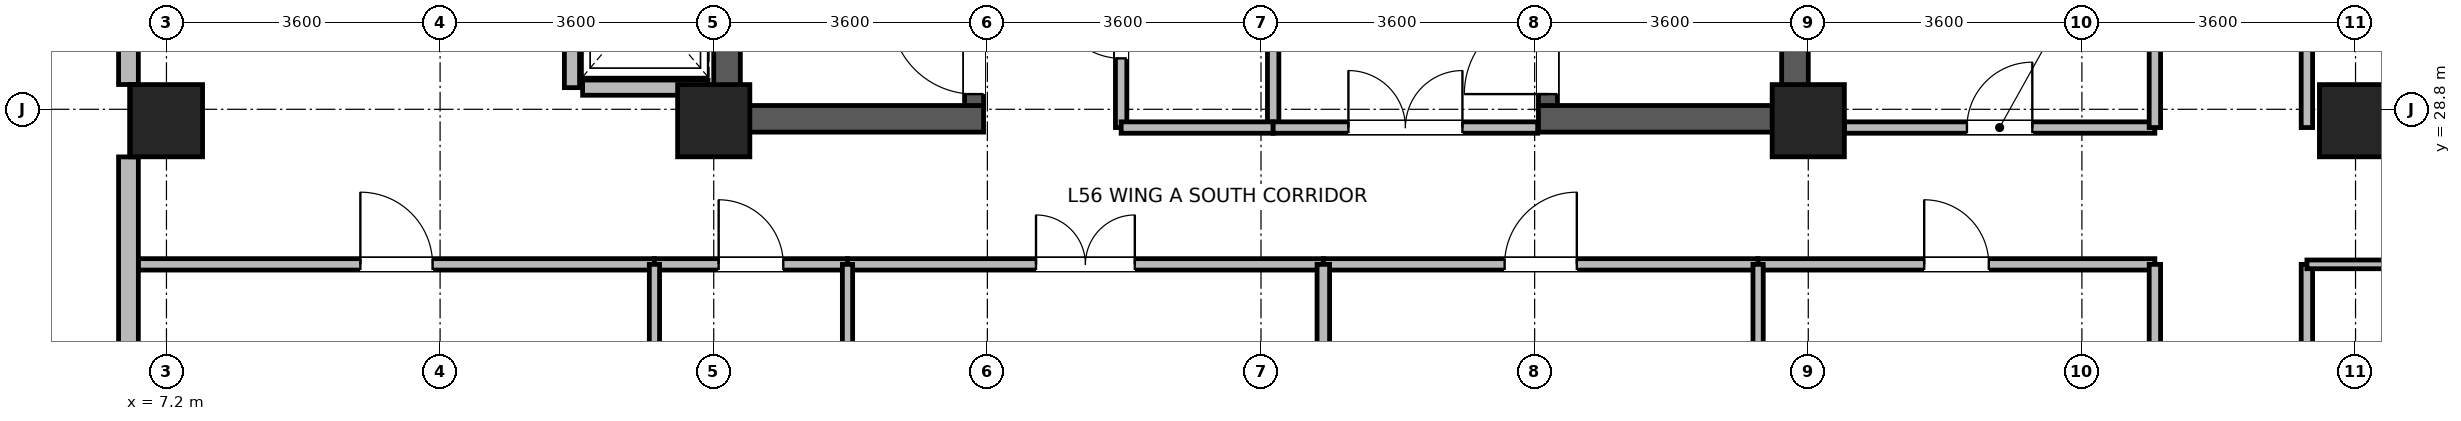
"""IFC4 building model, lengths in metres.
Left out: names, types, materials, properties, quantities, classifications, styles, units other than length and angle.
Written with IfcOpenShell. Run it as: python <this file> out.ifc"""

import sys

from ifc_helpers import new_model, si_unit, direction, frame, frame_2d, origin, origin_2d, place, context, subcontext, project, spatial, rectangle, extrude, source, transform, mapped, element, fill, save


model = new_model("IFC4")
c1 = context("Model", 3, precision=1e-05, world=origin(), true_north=direction((0.0, 1.0)))
c2 = subcontext(c1, "Body", "Model", "MODEL_VIEW")
j1 = project(units=[si_unit("LENGTHUNIT", "METRE"), si_unit("PLANEANGLEUNIT", "RADIAN")], contexts=[c1])
p1 = place(None, origin())
s1 = spatial("IfcSite", under=j1, at=p1, CompositionType="ELEMENT")
p2 = place(p1, origin())
s2 = spatial("IfcBuilding", under=s1, at=p2, CompositionType="ELEMENT")
p3 = place(p2, frame((0.0, 0.0, 220.3)))
s3 = spatial("IfcBuildingStorey", under=s2, at=p3, CompositionType="ELEMENT", Elevation=220.3)
for number, where, z_axis, x_axis in (
    (1, (14.575, 28.5, 0.0), (0.0, 0.0, 1.0), (0.0, 1.0, 0.0)),
    (2, (28.625, 28.5, 0.0), (0.0, 0.0, 1.0), (0.0, 1.0, 0.0)),
):
    element("IfcWall", number, at=place(p3, frame(where, z_axis=z_axis, x_axis=x_axis)), inside=s3, PredefinedType="SHEAR", context=c2, shape_type="SweptSolid", body=[
        extrude(rectangle(XDim=7.7, YDim=0.35, at=frame_2d((3.85, 0.0))), origin(), (0.0, 0.0, 1.0), 3.47),
    ])
for number, where, z_axis, x_axis in (
    (3, (14.75, 28.675, 0.0), (0.0, 0.0, 1.0), (1.0, 0.0, 0.0)),
    (4, (25.25, 28.675, 0.0), (0.0, 0.0, 1.0), (1.0, 0.0, 0.0)),
):
    element("IfcWall", number, at=place(p3, frame(where, z_axis=z_axis, x_axis=x_axis)), inside=s3, PredefinedType="SHEAR", context=c2, shape_type="SweptSolid", body=[
        extrude(rectangle(XDim=3.2, YDim=0.35, at=frame_2d((1.6, 0.0))), origin(), (0.0, 0.0, 1.0), 3.47),
    ])
p4 = place(p3, frame((17.825, 28.85, 0.0), z_axis=(0.0, 0.0, 1.0), x_axis=(0.0, 1.0, 0.0)))
e5 = element("IfcWall", 5, at=p4, inside=s3, PredefinedType="SHEAR", context=c2, shape_type="SweptSolid", body=[
    extrude(rectangle(XDim=7.0, YDim=0.25, at=frame_2d((3.5, 0.0))), origin(), (0.0, 0.0, 1.0), 3.47),
])
p5 = place(p4, frame((0.15, 0.0, 0.0)))
e6 = element("IfcOpeningElement", 6, at=p5, cuts=e5, PredefinedType="OPENING", context=c2, shape_type="SweptSolid", body=[
    extrude(rectangle(XDim=1.1, YDim=2.08, at=frame_2d((0.55, 1.04))), frame((0.0, 0.135, 0.0), z_axis=(0.0, -1.0, 0.0), x_axis=(1.0, 0.0, 0.0)), (0.0, 0.0, 1.0), 0.27),
])
p6 = place(p3, frame((25.375, 28.85, 0.0), z_axis=(0.0, 0.0, 1.0), x_axis=(0.0, 1.0, 0.0)))
e7 = element("IfcWall", 7, at=p6, inside=s3, PredefinedType="SHEAR", context=c2, shape_type="SweptSolid", body=[
    extrude(rectangle(XDim=7.0, YDim=0.25, at=frame_2d((3.5, 0.0))), origin(), (0.0, 0.0, 1.0), 3.47),
])
p7 = place(p6, frame((0.15, 0.0, 0.0)))
e8 = element("IfcOpeningElement", 8, at=p7, cuts=e7, PredefinedType="OPENING", context=c2, shape_type="SweptSolid", body=[
    extrude(rectangle(XDim=1.1, YDim=2.08, at=frame_2d((0.55, 1.04))), frame((0.0, 0.135, 0.0), z_axis=(0.0, -1.0, 0.0), x_axis=(1.0, 0.0, 0.0)), (0.0, 0.0, 1.0), 0.27),
])
m1 = source(origin(), c2, "Body", "SweptSolid", [
    extrude(rectangle(XDim=0.95, YDim=0.95, at=origin_2d()), origin(), (0.0, 0.0, 1.0), 3.7),
])
for number, where, z_axis, x_axis in (
    (9, (7.2, 28.65, 0.0), (0.0, 0.0, 1.0), (1.0, 0.0, 0.0)),
    (10, (14.4, 28.65, 0.0), (0.0, 0.0, 1.0), (1.0, 0.0, 0.0)),
    (11, (28.8, 28.65, 0.0), (0.0, 0.0, 1.0), (1.0, 0.0, 0.0)),
    (12, (36.0, 28.65, 0.0), (0.0, 0.0, 1.0), (1.0, 0.0, 0.0)),
):
    element("IfcColumn", number, at=place(p3, frame(where, z_axis=z_axis, x_axis=x_axis)), inside=s3, PredefinedType="COLUMN", context=c2, shape_type="MappedRepresentation", body=[
        mapped(m1, transform((0.0, 0.0, 0.0), x_axis=(1.0, 0.0, 0.0), y_axis=(0.0, 1.0, 0.0), z_axis=(0.0, 0.0, 1.0), scale=1.0)),
    ])
p8 = place(p3, frame((6.7, 29.126, 0.0), z_axis=(0.0, 0.0, 1.0), x_axis=(0.0, 1.0, 0.0)))
e13 = element("IfcWall", 13, at=p8, inside=s3, PredefinedType="STANDARD", context=c2, shape_type="SweptSolid", body=[
    extrude(rectangle(XDim=6.548, YDim=0.26, at=frame_2d((3.274, 0.0))), origin(), (0.0, 0.0, 1.0), 3.45),
])
p9 = place(p8, frame((0.737, 0.0, 0.85)))
e14 = element("IfcOpeningElement", 14, at=p9, cuts=e13, PredefinedType="OPENING", context=c2, shape_type="SweptSolid", body=[
    extrude(rectangle(XDim=1.8, YDim=1.85, at=frame_2d((0.9, 0.925))), frame((0.0, 0.14, 0.0), z_axis=(0.0, -1.0, 0.0), x_axis=(1.0, 0.0, 0.0)), (0.0, 0.0, 1.0), 0.28),
])
p10 = place(p8, frame((4.011, 0.0, 0.85)))
e15 = element("IfcOpeningElement", 15, at=p10, cuts=e13, PredefinedType="OPENING", context=c2, shape_type="SweptSolid", body=[
    extrude(rectangle(XDim=1.8, YDim=1.85, at=frame_2d((0.9, 0.925))), frame((0.0, 0.14, 0.0), z_axis=(0.0, -1.0, 0.0), x_axis=(1.0, 0.0, 0.0)), (0.0, 0.0, 1.0), 0.28),
])
p11 = place(p3, frame((6.7, 21.47, 0.0), z_axis=(0.0, 0.0, 1.0), x_axis=(0.0, 1.0, 0.0)))
e16 = element("IfcWall", 16, at=p11, inside=s3, PredefinedType="STANDARD", context=c2, shape_type="SweptSolid", body=[
    extrude(rectangle(XDim=6.704, YDim=0.26, at=frame_2d((3.352, 0.0))), origin(), (0.0, 0.0, 1.0), 3.45),
])
p12 = place(p11, frame((2.877, 0.0, 0.85)))
e17 = element("IfcOpeningElement", 17, at=p12, cuts=e16, PredefinedType="OPENING", context=c2, shape_type="SweptSolid", body=[
    extrude(rectangle(XDim=0.95, YDim=1.75, at=frame_2d((0.475, 0.875))), frame((0.0, 0.14, 0.0), z_axis=(0.0, -1.0, 0.0), x_axis=(1.0, 0.0, 0.0)), (0.0, 0.0, 1.0), 0.28),
])
p13 = place(p3, frame((12.675, 29.085, 0.0), z_axis=(0.0, 0.0, 1.0), x_axis=(1.0, 0.0, 0.0)))
e18 = element("IfcWall", 18, at=p13, inside=s3, PredefinedType="PARTITIONING", context=c2, shape_type="SweptSolid", body=[
    extrude(rectangle(XDim=1.65, YDim=0.2, at=frame_2d((0.825, 0.0))), origin(), (0.0, 0.0, 1.0), 3.45),
])
p14 = place(p3, frame((12.535, 29.085, 0.0), z_axis=(0.0, 0.0, 1.0), x_axis=(0.0, 1.0, 0.0)))
e19 = element("IfcWall", 19, at=p14, inside=s3, PredefinedType="PARTITIONING", context=c2, shape_type="SweptSolid", body=[
    extrude(rectangle(XDim=2.23, YDim=0.2, at=frame_2d((1.115, 0.0))), origin(), (0.0, 0.0, 1.0), 3.45),
])
p15 = place(p3, frame((35.36, 16.96, 0.0), z_axis=(0.0, 0.0, 1.0), x_axis=(0.0, 1.0, 0.0)))
e20 = element("IfcWall", 20, at=p15, inside=s3, PredefinedType="PARTITIONING", context=c2, shape_type="SweptSolid", body=[
    extrude(rectangle(XDim=9.8, YDim=0.15, at=frame_2d((4.9, 0.0))), origin(), (0.0, 0.0, 1.0), 3.45),
])
p16 = place(p15, frame((2.486, 0.0, 0.0)))
e21 = element("IfcOpeningElement", 21, at=p16, cuts=e20, PredefinedType="OPENING", context=c2, shape_type="SweptSolid", body=[
    extrude(rectangle(XDim=1.3, YDim=2.12, at=frame_2d((0.65, 1.06))), frame((0.0, 0.085, 0.0), z_axis=(0.0, -1.0, 0.0), x_axis=(1.0, 0.0, 0.0)), (0.0, 0.0, 1.0), 0.17),
])
p17 = place(p3, frame((35.36, 28.56, 0.0), z_axis=(0.0, 0.0, 1.0), x_axis=(0.0, 1.0, 0.0)))
e22 = element("IfcWall", 22, at=p17, inside=s3, PredefinedType="PARTITIONING", context=c2, shape_type="SweptSolid", body=[
    extrude(rectangle(XDim=7.68, YDim=0.15, at=frame_2d((3.84, 0.0))), origin(), (0.0, 0.0, 1.0), 3.45),
])
p18 = place(p17, frame((3.19, 0.0, 0.0)))
e23 = element("IfcOpeningElement", 23, at=p18, cuts=e22, PredefinedType="OPENING", context=c2, shape_type="SweptSolid", body=[
    extrude(rectangle(XDim=1.3, YDim=2.12, at=frame_2d((0.65, 1.06))), frame((0.0, 0.085, 0.0), z_axis=(0.0, -1.0, 0.0), x_axis=(1.0, 0.0, 0.0)), (0.0, 0.0, 1.0), 0.17),
])
p19 = place(p3, frame((6.832, 26.76, 0.0), z_axis=(0.0, 0.0, 1.0), x_axis=(1.0, 0.0, 0.0)))
e24 = element("IfcWall", 24, at=p19, inside=s3, PredefinedType="PARTITIONING", context=c2, shape_type="SweptSolid", body=[
    extrude(rectangle(XDim=6.788, YDim=0.15, at=frame_2d((3.394, 0.0))), origin(), (0.0, 0.0, 1.0), 3.45),
])
p20 = place(p19, frame((2.919, 0.0, 0.0)))
e25 = element("IfcOpeningElement", 25, at=p20, cuts=e24, PredefinedType="OPENING", context=c2, shape_type="SweptSolid", body=[
    extrude(rectangle(XDim=0.95, YDim=2.1, at=frame_2d((0.475, 1.05))), frame((0.0, 0.085, 0.0), z_axis=(0.0, -1.0, 0.0), x_axis=(1.0, 0.0, 0.0)), (0.0, 0.0, 1.0), 0.17),
])
p21 = place(p3, frame((16.16, 26.76, 0.0), z_axis=(0.0, 0.0, 1.0), x_axis=(1.0, 0.0, 0.0)))
e26 = element("IfcWall", 26, at=p21, inside=s3, PredefinedType="PARTITIONING", context=c2, shape_type="SweptSolid", body=[
    extrude(rectangle(XDim=6.26, YDim=0.15, at=frame_2d((3.13, 0.0))), origin(), (0.0, 0.0, 1.0), 3.45),
])
p22 = place(p21, frame((2.48, 0.0, 0.0)))
e27 = element("IfcOpeningElement", 27, at=p22, cuts=e26, PredefinedType="OPENING", context=c2, shape_type="SweptSolid", body=[
    extrude(rectangle(XDim=1.3, YDim=2.12, at=frame_2d((0.65, 1.06))), frame((0.0, 0.085, 0.0), z_axis=(0.0, -1.0, 0.0), x_axis=(1.0, 0.0, 0.0)), (0.0, 0.0, 1.0), 0.17),
])
p23 = place(p3, frame((22.42, 26.76, 0.0), z_axis=(0.0, 0.0, 1.0), x_axis=(1.0, 0.0, 0.0)))
e28 = element("IfcWall", 28, at=p23, inside=s3, PredefinedType="PARTITIONING", context=c2, shape_type="SweptSolid", body=[
    extrude(rectangle(XDim=5.72, YDim=0.15, at=frame_2d((2.86, 0.0))), origin(), (0.0, 0.0, 1.0), 3.45),
])
p24 = place(p23, frame((2.385, 0.0, 0.0)))
e29 = element("IfcOpeningElement", 29, at=p24, cuts=e28, PredefinedType="OPENING", context=c2, shape_type="SweptSolid", body=[
    extrude(rectangle(XDim=0.95, YDim=2.1, at=frame_2d((0.475, 1.05))), frame((0.0, 0.085, 0.0), z_axis=(0.0, -1.0, 0.0), x_axis=(1.0, 0.0, 0.0)), (0.0, 0.0, 1.0), 0.17),
])
p25 = place(p3, frame((28.14, 26.76, 0.0), z_axis=(0.0, 0.0, 1.0), x_axis=(1.0, 0.0, 0.0)))
e30 = element("IfcWall", 30, at=p25, inside=s3, PredefinedType="PARTITIONING", context=c2, shape_type="SweptSolid", body=[
    extrude(rectangle(XDim=5.22, YDim=0.15, at=frame_2d((2.61, 0.0))), origin(), (0.0, 0.0, 1.0), 3.45),
])
p26 = place(p25, frame((2.185, 0.0, 0.0)))
e31 = element("IfcOpeningElement", 31, at=p26, cuts=e30, PredefinedType="OPENING", context=c2, shape_type="SweptSolid", body=[
    extrude(rectangle(XDim=0.85, YDim=2.04, at=frame_2d((0.425, 1.02))), frame((0.0, 0.085, 0.0), z_axis=(0.0, -1.0, 0.0), x_axis=(1.0, 0.0, 0.0)), (0.0, 0.0, 1.0), 0.17),
])
p27 = place(p3, frame((33.36, 21.6, 0.0), z_axis=(0.0, 0.0, 1.0), x_axis=(0.0, 1.0, 0.0)))
e32 = element("IfcWall", 32, at=p27, inside=s3, PredefinedType="PARTITIONING", context=c2, shape_type="SweptSolid", body=[
    extrude(rectangle(XDim=5.16, YDim=0.15, at=frame_2d((2.58, 0.0))), origin(), (0.0, 0.0, 1.0), 3.45),
])
p28 = place(p3, frame((29.275, 28.56, 0.0), z_axis=(0.0, 0.0, 1.0), x_axis=(1.0, 0.0, 0.0)))
e33 = element("IfcWall", 33, at=p28, inside=s3, PredefinedType="PARTITIONING", context=c2, shape_type="SweptSolid", body=[
    extrude(rectangle(XDim=4.085, YDim=0.15, at=frame_2d((2.042, 0.0))), origin(), (0.0, 0.0, 1.0), 2.9),
])
p29 = place(p28, frame((1.613, 0.0, 0.0)))
e34 = element("IfcOpeningElement", 34, at=p29, cuts=e33, PredefinedType="OPENING", context=c2, shape_type="SweptSolid", body=[
    extrude(rectangle(XDim=0.86, YDim=2.02, at=frame_2d((0.43, 1.01))), frame((0.0, 0.085, 0.0), z_axis=(0.0, -1.0, 0.0), x_axis=(1.0, 0.0, 0.0)), (0.0, 0.0, 1.0), 0.17),
])
p30 = place(p3, frame((33.36, 28.56, 0.0), z_axis=(0.0, 0.0, 1.0), x_axis=(0.0, 1.0, 0.0)))
e35 = element("IfcWall", 35, at=p30, inside=s3, PredefinedType="PARTITIONING", context=c2, shape_type="SweptSolid", body=[
    extrude(rectangle(XDim=3.08, YDim=0.15, at=frame_2d((1.54, 0.0))), origin(), (0.0, 0.0, 1.0), 3.45),
])
p31 = place(p3, frame((19.76, 28.56, 0.0), z_axis=(0.0, 0.0, 1.0), x_axis=(0.0, 1.0, 0.0)))
e36 = element("IfcWall", 36, at=p31, inside=s3, PredefinedType="PARTITIONING", context=c2, shape_type="SweptSolid", body=[
    extrude(rectangle(XDim=2.68, YDim=0.15, at=frame_2d((1.34, 0.0))), origin(), (0.0, 0.0, 1.0), 3.45),
])
p32 = place(p31, frame((0.91, 0.0, 0.0)))
e37 = element("IfcOpeningElement", 37, at=p32, cuts=e36, PredefinedType="OPENING", context=c2, shape_type="SweptSolid", body=[
    extrude(rectangle(XDim=0.86, YDim=2.02, at=frame_2d((0.43, 1.01))), frame((0.0, 0.085, 0.0), z_axis=(0.0, -1.0, 0.0), x_axis=(1.0, 0.0, 0.0)), (0.0, 0.0, 1.0), 0.17),
])
p33 = place(p3, frame((21.76, 28.56, 0.0), z_axis=(0.0, 0.0, 1.0), x_axis=(0.0, 1.0, 0.0)))
e38 = element("IfcWall", 38, at=p33, inside=s3, PredefinedType="PARTITIONING", context=c2, shape_type="SweptSolid", body=[
    extrude(rectangle(XDim=2.68, YDim=0.15, at=frame_2d((1.34, 0.0))), origin(), (0.0, 0.0, 1.0), 3.45),
])
p34 = place(p3, frame((13.62, 26.76, 0.0), z_axis=(0.0, 0.0, 1.0), x_axis=(1.0, 0.0, 0.0)))
e39 = element("IfcWall", 39, at=p34, inside=s3, PredefinedType="PARTITIONING", context=c2, shape_type="SweptSolid", body=[
    extrude(rectangle(XDim=2.54, YDim=0.15, at=frame_2d((1.27, 0.0))), origin(), (0.0, 0.0, 1.0), 3.45),
])
p35 = place(p34, frame((0.845, 0.0, 0.0)))
e40 = element("IfcOpeningElement", 40, at=p35, cuts=e39, PredefinedType="OPENING", context=c2, shape_type="SweptSolid", body=[
    extrude(rectangle(XDim=0.85, YDim=2.04, at=frame_2d((0.425, 1.02))), frame((0.0, 0.085, 0.0), z_axis=(0.0, -1.0, 0.0), x_axis=(1.0, 0.0, 0.0)), (0.0, 0.0, 1.0), 0.17),
])
p36 = place(p3, frame((19.76, 28.56, 0.0), z_axis=(0.0, 0.0, 1.0), x_axis=(1.0, 0.0, 0.0)))
e41 = element("IfcWall", 41, at=p36, inside=s3, PredefinedType="PARTITIONING", context=c2, shape_type="SweptSolid", body=[
    extrude(rectangle(XDim=2.0, YDim=0.15, at=frame_2d((1.0, 0.0))), origin(), (0.0, 0.0, 1.0), 2.55),
])
p37 = place(p3, frame((35.36, 26.76, 0.0), z_axis=(0.0, 0.0, 1.0), x_axis=(1.0, 0.0, 0.0)))
e42 = element("IfcWall", 42, at=p37, inside=s3, PredefinedType="PARTITIONING", context=c2, shape_type="SweptSolid", body=[
    extrude(rectangle(XDim=7.06, YDim=0.115, at=frame_2d((3.53, 0.0))), origin(), (0.0, 0.0, 1.0), 3.45),
])
for number, where, z_axis, x_axis in (
    (43, (13.62, 21.732, 0.0), (0.0, 0.0, 1.0), (0.0, 1.0, 0.0)),
    (44, (16.16, 21.732, 0.0), (0.0, 0.0, 1.0), (0.0, 1.0, 0.0)),
):
    element("IfcWall", number, at=place(p3, frame(where, z_axis=z_axis, x_axis=x_axis)), inside=s3, PredefinedType="PARTITIONING", context=c2, shape_type="SweptSolid", body=[
        extrude(rectangle(XDim=5.028, YDim=0.135, at=frame_2d((2.514, 0.0))), origin(), (0.0, 0.0, 1.0), 3.45),
    ])
p38 = place(p3, frame((22.42, 21.732, 0.0), z_axis=(0.0, 0.0, 1.0), x_axis=(0.0, 1.0, 0.0)))
e45 = element("IfcWall", 45, at=p38, inside=s3, PredefinedType="PARTITIONING", context=c2, shape_type="SweptSolid", body=[
    extrude(rectangle(XDim=5.028, YDim=0.165, at=frame_2d((2.514, 0.0))), origin(), (0.0, 0.0, 1.0), 3.45),
])
p39 = place(p3, frame((28.14, 21.732, 0.0), z_axis=(0.0, 0.0, 1.0), x_axis=(0.0, 1.0, 0.0)))
e46 = element("IfcWall", 46, at=p39, inside=s3, PredefinedType="PARTITIONING", context=c2, shape_type="SweptSolid", body=[
    extrude(rectangle(XDim=5.028, YDim=0.135, at=frame_2d((2.514, 0.0))), origin(), (0.0, 0.0, 1.0), 3.45),
])
p40 = place(p3, frame((21.76, 28.56, 0.0), z_axis=(0.0, 0.0, 1.0), x_axis=(1.0, 0.0, 0.0)))
e47 = element("IfcWall", 47, at=p40, inside=s3, PredefinedType="PARTITIONING", context=c2, shape_type="SweptSolid", body=[
    extrude(rectangle(XDim=3.48, YDim=0.15, at=frame_2d((1.74, 0.0))), origin(), (0.0, 0.0, 1.0), 2.55),
])
p41 = place(p40, frame((0.99, 0.0, 0.0)))
e48 = element("IfcOpeningElement", 48, at=p41, cuts=e47, PredefinedType="OPENING", context=c2, shape_type="SweptSolid", body=[
    extrude(rectangle(XDim=1.5, YDim=2.1, at=frame_2d((0.75, 1.05))), frame((0.0, 0.085, 0.0), z_axis=(0.0, -1.0, 0.0), x_axis=(1.0, 0.0, 0.0)), (0.0, 0.0, 1.0), 0.17),
])
p42 = place(p5, origin())
e49 = element("IfcDoor", 49, at=p42, inside=s3, OperationType="SINGLE_SWING_RIGHT", PredefinedType="DOOR", context=c2, shape_type="SweptSolid", body=[
    extrude(rectangle(XDim=1.1, YDim=2.08, at=frame_2d((0.55, 1.04))), frame((0.0, 0.025, 0.0), z_axis=(0.0, -1.0, 0.0), x_axis=(1.0, 0.0, 0.0)), (0.0, 0.0, 1.0), 0.05),
])
fill(e6, e49)
p43 = place(p7, origin())
e50 = element("IfcDoor", 50, at=p43, inside=s3, OperationType="SINGLE_SWING_LEFT", PredefinedType="DOOR", context=c2, shape_type="SweptSolid", body=[
    extrude(rectangle(XDim=1.1, YDim=2.08, at=frame_2d((0.55, 1.04))), frame((0.0, 0.025, 0.0), z_axis=(0.0, -1.0, 0.0), x_axis=(1.0, 0.0, 0.0)), (0.0, 0.0, 1.0), 0.05),
])
fill(e8, e50)
p44 = place(p20, origin())
e51 = element("IfcDoor", 51, at=p44, inside=s3, OperationType="SINGLE_SWING_LEFT", PredefinedType="DOOR", context=c2, shape_type="SweptSolid", body=[
    extrude(rectangle(XDim=0.95, YDim=2.1, at=frame_2d((0.475, 1.05))), frame((0.0, 0.025, 0.0), z_axis=(0.0, -1.0, 0.0), x_axis=(1.0, 0.0, 0.0)), (0.0, 0.0, 1.0), 0.05),
])
fill(e25, e51)
p45 = place(p22, origin())
e52 = element("IfcDoor", 52, at=p45, inside=s3, OperationType="DOUBLE_DOOR_SINGLE_SWING", PredefinedType="DOOR", context=c2, shape_type="SweptSolid", body=[
    extrude(rectangle(XDim=1.3, YDim=2.12, at=frame_2d((0.65, 1.06))), frame((0.0, 0.025, 0.0), z_axis=(0.0, -1.0, 0.0), x_axis=(1.0, 0.0, 0.0)), (0.0, 0.0, 1.0), 0.05),
])
fill(e27, e52)
p46 = place(p24, origin())
e53 = element("IfcDoor", 53, at=p46, inside=s3, OperationType="SINGLE_SWING_RIGHT", PredefinedType="DOOR", context=c2, shape_type="SweptSolid", body=[
    extrude(rectangle(XDim=0.95, YDim=2.1, at=frame_2d((0.475, 1.05))), frame((0.0, 0.025, 0.0), z_axis=(0.0, -1.0, 0.0), x_axis=(1.0, 0.0, 0.0)), (0.0, 0.0, 1.0), 0.05),
])
fill(e29, e53)
p47 = place(p26, origin())
e54 = element("IfcDoor", 54, at=p47, inside=s3, OperationType="SINGLE_SWING_LEFT", PredefinedType="DOOR", context=c2, shape_type="SweptSolid", body=[
    extrude(rectangle(XDim=0.85, YDim=2.04, at=frame_2d((0.425, 1.02))), frame((0.0, 0.025, 0.0), z_axis=(0.0, -1.0, 0.0), x_axis=(1.0, 0.0, 0.0)), (0.0, 0.0, 1.0), 0.05),
])
fill(e31, e54)
p48 = place(p29, origin())
e55 = element("IfcDoor", 55, at=p48, inside=s3, OperationType="SINGLE_SWING_RIGHT", PredefinedType="DOOR", context=c2, shape_type="SweptSolid", body=[
    extrude(rectangle(XDim=0.86, YDim=2.02, at=frame_2d((0.43, 1.01))), frame((0.0, 0.025, 0.0), z_axis=(0.0, -1.0, 0.0), x_axis=(1.0, 0.0, 0.0)), (0.0, 0.0, 1.0), 0.05),
])
fill(e34, e55)
p49 = place(p32, origin())
e56 = element("IfcDoor", 56, at=p49, inside=s3, OperationType="SINGLE_SWING_RIGHT", PredefinedType="DOOR", context=c2, shape_type="SweptSolid", body=[
    extrude(rectangle(XDim=0.86, YDim=2.02, at=frame_2d((0.43, 1.01))), frame((0.0, 0.025, 0.0), z_axis=(0.0, -1.0, 0.0), x_axis=(1.0, 0.0, 0.0)), (0.0, 0.0, 1.0), 0.05),
])
fill(e37, e56)
p50 = place(p35, origin())
e57 = element("IfcDoor", 57, at=p50, inside=s3, OperationType="SINGLE_SWING_LEFT", PredefinedType="DOOR", context=c2, shape_type="SweptSolid", body=[
    extrude(rectangle(XDim=0.85, YDim=2.04, at=frame_2d((0.425, 1.02))), frame((0.0, 0.025, 0.0), z_axis=(0.0, -1.0, 0.0), x_axis=(1.0, 0.0, 0.0)), (0.0, 0.0, 1.0), 0.05),
])
fill(e40, e57)
p51 = place(p41, origin())
e58 = element("IfcDoor", 58, at=p51, inside=s3, OperationType="DOUBLE_DOOR_SINGLE_SWING", PredefinedType="DOOR", context=c2, shape_type="SweptSolid", body=[
    extrude(rectangle(XDim=1.5, YDim=2.1, at=frame_2d((0.75, 1.05))), frame((0.0, 0.025, 0.0), z_axis=(0.0, -1.0, 0.0), x_axis=(1.0, 0.0, 0.0)), (0.0, 0.0, 1.0), 0.05),
])
fill(e48, e58)
save(model, sys.argv[1])
